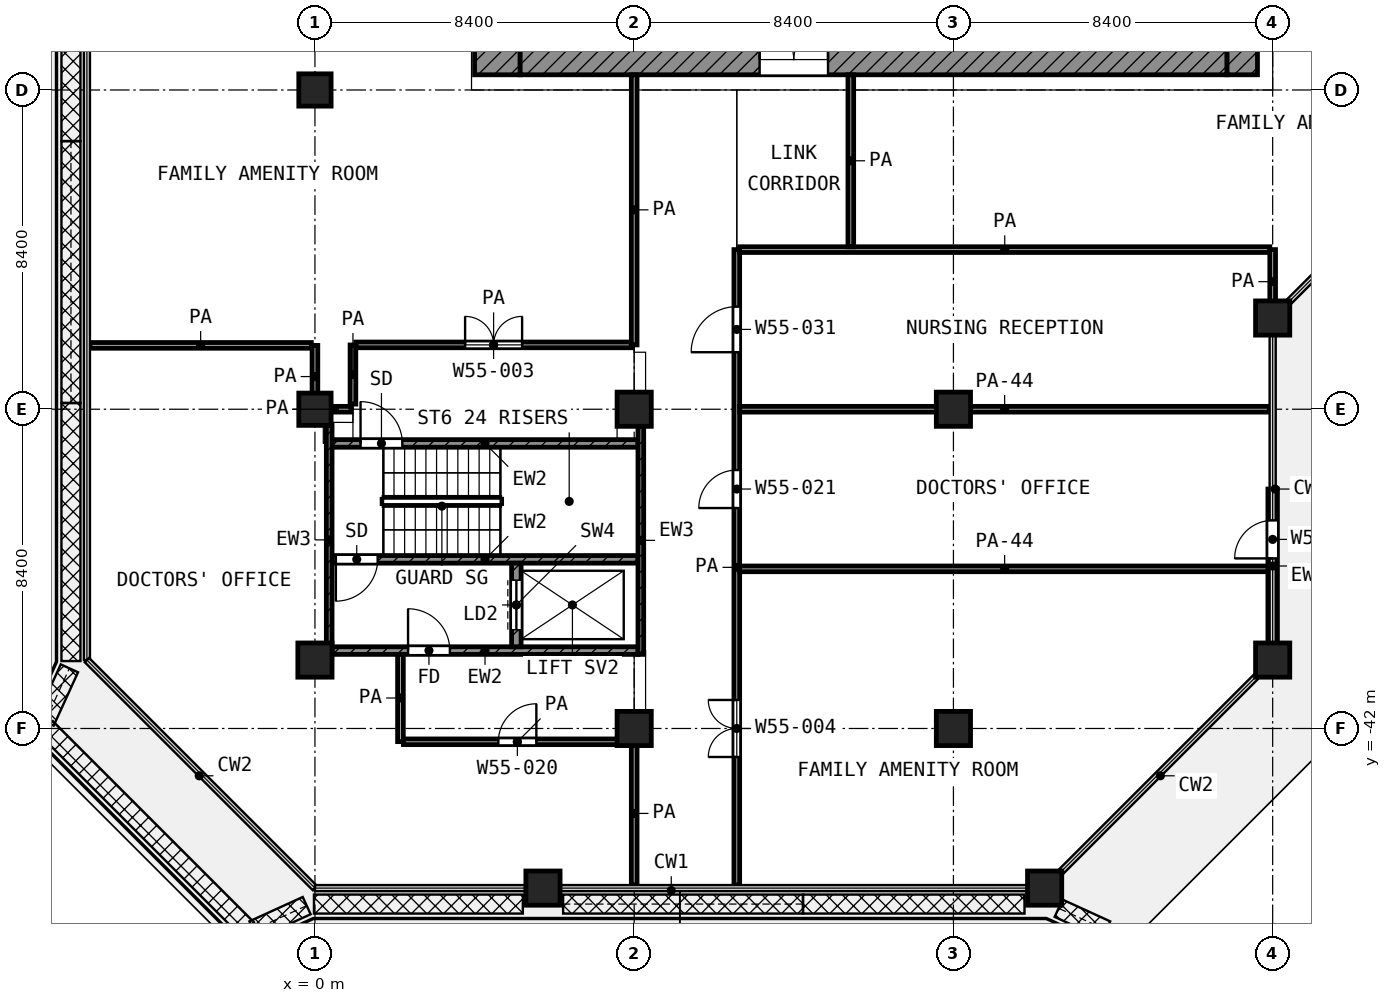
"""IFC4 building model, lengths in metres.
Left out: names, types, materials, properties, quantities, classifications, styles, units other than length and angle.
Written with IfcOpenShell. Run it as: python <this file> out.ifc"""

import sys

from ifc_helpers import new_model, si_unit, direction, frame, frame_2d, origin, origin_2d, place, context, subcontext, project, spatial, rectangle, extrude, element, fill, save


model = new_model("IFC4")
c1 = context("Model", 3, precision=1e-05, world=origin(), true_north=direction((0.0, 1.0)))
c2 = subcontext(c1, "Body", "Model", "MODEL_VIEW")
j1 = project(units=[si_unit("LENGTHUNIT", "METRE"), si_unit("PLANEANGLEUNIT", "RADIAN")], contexts=[c1])
p1 = place(None, origin())
s1 = spatial("IfcSite", under=j1, at=p1, CompositionType="ELEMENT")
p2 = place(p1, origin())
s2 = spatial("IfcBuilding", under=s1, at=p2, CompositionType="ELEMENT")
p3 = place(p2, frame((0.0, 0.0, 239.0)))
s3 = spatial("IfcBuildingStorey", under=s2, at=p3, CompositionType="ELEMENT", Elevation=239.0)
p4 = place(p3, frame((0.0, -25.2, 0.0), z_axis=(0.0, 0.0, 1.0), x_axis=(1.0, 0.0, 0.0)))
e1 = element("IfcColumn", 1, at=p4, inside=s3, PredefinedType="COLUMN", context=c2, shape_type="SweptSolid", body=[
    extrude(rectangle(XDim=0.85, YDim=0.85, at=origin_2d()), origin(), (0.0, 0.0, 1.0), 4.2),
])
p5 = place(p3, frame((25.2, -31.2, 0.0), z_axis=(0.0, 0.0, 1.0), x_axis=(1.0, 0.0, 0.0)))
e2 = element("IfcColumn", 2, at=p5, inside=s3, PredefinedType="COLUMN", context=c2, shape_type="SweptSolid", body=[
    extrude(rectangle(XDim=0.9, YDim=0.9, at=origin_2d()), origin(), (0.0, 0.0, 1.0), 4.2),
])
p6 = place(p3, frame((0.0, -33.6, 0.0), z_axis=(0.0, 0.0, 1.0), x_axis=(1.0, 0.0, 0.0)))
e3 = element("IfcColumn", 3, at=p6, inside=s3, PredefinedType="COLUMN", context=c2, shape_type="SweptSolid", body=[
    extrude(rectangle(XDim=0.85, YDim=0.85, at=origin_2d()), origin(), (0.0, 0.0, 1.0), 4.2),
])
for number, where, z_axis, x_axis in (
    (4, (8.4, -33.6, 0.0), (0.0, 0.0, 1.0), (1.0, 0.0, 0.0)),
    (5, (16.8, -33.6, 0.0), (0.0, 0.0, 1.0), (1.0, 0.0, 0.0)),
    (6, (0.0, -40.2, 0.0), (0.0, 0.0, 1.0), (1.0, 0.0, 0.0)),
    (7, (25.2, -40.2, 0.0), (0.0, 0.0, 1.0), (1.0, 0.0, 0.0)),
    (8, (8.4, -42.0, 0.0), (0.0, 0.0, 1.0), (1.0, 0.0, 0.0)),
    (9, (16.8, -42.0, 0.0), (0.0, 0.0, 1.0), (1.0, 0.0, 0.0)),
    (10, (6.0, -46.2, 0.0), (0.0, 0.0, 1.0), (1.0, 0.0, 0.0)),
    (11, (19.2, -46.2, 0.0), (0.0, 0.0, 1.0), (1.0, 0.0, 0.0)),
):
    element("IfcColumn", number, at=place(p3, frame(where, z_axis=z_axis, x_axis=x_axis)), inside=s3, PredefinedType="COLUMN", context=c2, shape_type="SweptSolid", body=[
        extrude(rectangle(XDim=0.9, YDim=0.9, at=origin_2d()), origin(), (0.0, 0.0, 1.0), 4.2),
    ])
p7 = place(p3, frame((25.2, -39.75, 0.0), z_axis=(0.0, 0.0, 1.0), x_axis=(0.0, 1.0, 0.0)))
e12 = element("IfcWall", 12, at=p7, inside=s3, PredefinedType="SOLIDWALL", context=c2, shape_type="SweptSolid", body=[
    extrude(rectangle(XDim=4.05, YDim=0.25, at=frame_2d((2.025, 0.0))), origin(), (0.0, 0.0, 1.0), 2.58),
])
p8 = place(p7, frame((2.225, 0.0, 0.0)))
e13 = element("IfcOpeningElement", 13, at=p8, cuts=e12, PredefinedType="OPENING", context=c2, shape_type="SweptSolid", body=[
    extrude(rectangle(XDim=1.0, YDim=2.1, at=frame_2d((0.5, 1.05))), frame((0.0, 0.135, 0.0), z_axis=(0.0, -1.0, 0.0), x_axis=(1.0, 0.0, 0.0)), (0.0, 0.0, 1.0), 0.27),
])
p9 = place(p3, frame((4.8, -24.8, 0.0), z_axis=(0.0, 0.0, 1.0), x_axis=(0.0, 1.0, 0.0)))
e14 = element("IfcWall", 14, at=p9, inside=s3, PredefinedType="SHEAR", context=c2, shape_type="SweptSolid", body=[
    extrude(rectangle(XDim=19.4, YDim=1.2, at=frame_2d((9.7, 0.0))), origin(), (0.0, 0.0, 1.0), 3.6),
])
p10 = place(p9, frame((11.25, 0.0, 0.0)))
e15 = element("IfcOpeningElement", 15, at=p10, cuts=e14, PredefinedType="OPENING", context=c2, shape_type="SweptSolid", body=[
    extrude(rectangle(XDim=1.1, YDim=2.1, at=frame_2d((0.55, 1.05))), frame((0.0, 0.61, 0.0), z_axis=(0.0, -1.0, 0.0), x_axis=(1.0, 0.0, 0.0)), (0.0, 0.0, 1.0), 1.22),
])
p11 = place(p9, frame((1.95, 0.0, 0.0)))
e16 = element("IfcOpeningElement", 16, at=p11, cuts=e14, PredefinedType="OPENING", context=c2, shape_type="SweptSolid", body=[
    extrude(rectangle(XDim=1.1, YDim=2.1, at=frame_2d((0.55, 1.05))), frame((0.0, 0.61, 0.0), z_axis=(0.0, -1.0, 0.0), x_axis=(1.0, 0.0, 0.0)), (0.0, 0.0, 1.0), 1.22),
])
p12 = place(p3, frame((5.4, -24.4, 0.0), z_axis=(0.0, 0.0, 1.0), x_axis=(1.0, 0.0, 0.0)))
e17 = element("IfcWall", 17, at=p12, inside=s3, PredefinedType="SHEAR", context=c2, shape_type="SweptSolid", body=[
    extrude(rectangle(XDim=18.6, YDim=0.8, at=frame_2d((9.3, 0.0))), origin(), (0.0, 0.0, 1.0), 3.6),
])
p13 = place(p12, frame((6.3, 0.0, 0.0)))
e18 = element("IfcOpeningElement", 18, at=p13, cuts=e17, PredefinedType="OPENING", context=c2, shape_type="SweptSolid", body=[
    extrude(rectangle(XDim=1.8, YDim=2.1, at=frame_2d((0.9, 1.05))), frame((0.0, 0.41, 0.0), z_axis=(0.0, -1.0, 0.0), x_axis=(1.0, 0.0, 0.0)), (0.0, 0.0, 1.0), 0.82),
])
p14 = place(p3, frame((24.4, -24.8, 0.0), z_axis=(0.0, 0.0, 1.0), x_axis=(0.0, 1.0, 0.0)))
e19 = element("IfcWall", 19, at=p14, inside=s3, PredefinedType="SHEAR", context=c2, shape_type="SweptSolid", body=[
    extrude(rectangle(XDim=0.8, YDim=0.8, at=frame_2d((0.4, 0.0))), origin(), (0.0, 0.0, 1.0), 3.6),
])
p15 = place(p3, frame((0.375, -40.05, 0.0), z_axis=(0.0, 0.0, 1.0), x_axis=(0.0, 1.0, 0.0)))
e20 = element("IfcWall", 20, at=p15, inside=s3, PredefinedType="SHEAR", context=c2, shape_type="SweptSolid", body=[
    extrude(rectangle(XDim=6.025, YDim=0.15, at=frame_2d((3.013, 0.0))), origin(), (0.0, 0.0, 1.0), 3.6),
])
p16 = place(p3, frame((8.575, -40.05, 0.0), z_axis=(0.0, 0.0, 1.0), x_axis=(0.0, 1.0, 0.0)))
e21 = element("IfcWall", 21, at=p16, inside=s3, PredefinedType="SHEAR", context=c2, shape_type="SweptSolid", body=[
    extrude(rectangle(XDim=6.0, YDim=0.15, at=frame_2d((3.0, 0.0))), origin(), (0.0, 0.0, 1.0), 3.6),
])
p17 = place(p3, frame((0.45, -34.5, 0.0), z_axis=(0.0, 0.0, 1.0), x_axis=(1.0, 0.0, 0.0)))
e22 = element("IfcWall", 22, at=p17, inside=s3, PredefinedType="SHEAR", context=c2, shape_type="SweptSolid", body=[
    extrude(rectangle(XDim=8.05, YDim=0.2, at=frame_2d((4.025, 0.0))), origin(), (0.0, 0.0, 1.0), 3.6),
])
p18 = place(p17, frame((0.75, 0.0, 0.0)))
e23 = element("IfcOpeningElement", 23, at=p18, cuts=e22, PredefinedType="OPENING", context=c2, shape_type="SweptSolid", body=[
    extrude(rectangle(XDim=1.1, YDim=2.1, at=frame_2d((0.55, 1.05))), frame((0.0, 0.11, 0.0), z_axis=(0.0, -1.0, 0.0), x_axis=(1.0, 0.0, 0.0)), (0.0, 0.0, 1.0), 0.22),
])
p19 = place(p3, frame((0.45, -37.55, 0.0), z_axis=(0.0, 0.0, 1.0), x_axis=(1.0, 0.0, 0.0)))
e24 = element("IfcWall", 24, at=p19, inside=s3, PredefinedType="SHEAR", context=c2, shape_type="SweptSolid", body=[
    extrude(rectangle(XDim=8.05, YDim=0.2, at=frame_2d((4.025, 0.0))), origin(), (0.0, 0.0, 1.0), 3.6),
])
p20 = place(p19, frame((0.1, 0.0, 0.0)))
e25 = element("IfcOpeningElement", 25, at=p20, cuts=e24, PredefinedType="OPENING", context=c2, shape_type="SweptSolid", body=[
    extrude(rectangle(XDim=1.1, YDim=2.1, at=frame_2d((0.55, 1.05))), frame((0.0, 0.11, 0.0), z_axis=(0.0, -1.0, 0.0), x_axis=(1.0, 0.0, 0.0)), (0.0, 0.0, 1.0), 0.22),
])
p21 = place(p3, frame((0.45, -39.95, 0.0), z_axis=(0.0, 0.0, 1.0), x_axis=(1.0, 0.0, 0.0)))
e26 = element("IfcWall", 26, at=p21, inside=s3, PredefinedType="SHEAR", context=c2, shape_type="SweptSolid", body=[
    extrude(rectangle(XDim=8.05, YDim=0.2, at=frame_2d((4.025, 0.0))), origin(), (0.0, 0.0, 1.0), 3.6),
])
p22 = place(p21, frame((2.0, 0.0, 0.0)))
e27 = element("IfcOpeningElement", 27, at=p22, cuts=e26, PredefinedType="OPENING", context=c2, shape_type="SweptSolid", body=[
    extrude(rectangle(XDim=1.1, YDim=2.1, at=frame_2d((0.55, 1.05))), frame((0.0, 0.11, 0.0), z_axis=(0.0, -1.0, 0.0), x_axis=(1.0, 0.0, 0.0)), (0.0, 0.0, 1.0), 0.22),
])
p23 = place(p3, frame((5.3, -39.85, 0.0), z_axis=(0.0, 0.0, 1.0), x_axis=(0.0, 1.0, 0.0)))
e28 = element("IfcWall", 28, at=p23, inside=s3, PredefinedType="SHEAR", context=c2, shape_type="SweptSolid", body=[
    extrude(rectangle(XDim=2.2, YDim=0.25, at=frame_2d((1.1, 0.0))), origin(), (0.0, 0.0, 1.0), 3.6),
])
p24 = place(p23, frame((0.45, 0.0, 0.0)))
e29 = element("IfcOpeningElement", 29, at=p24, cuts=e28, PredefinedType="OPENING", context=c2, shape_type="SweptSolid", body=[
    extrude(rectangle(XDim=1.3, YDim=2.1, at=frame_2d((0.65, 1.05))), frame((0.0, 0.135, 0.0), z_axis=(0.0, -1.0, 0.0), x_axis=(1.0, 0.0, 0.0)), (0.0, 0.0, 1.0), 0.27),
])
p25 = place(p3, frame((2.327, -42.35, 0.0), z_axis=(0.0, 0.0, 1.0), x_axis=(1.0, 0.0, 0.0)))
e30 = element("IfcWall", 30, at=p25, inside=s3, PredefinedType="PARTITIONING", context=c2, shape_type="SweptSolid", body=[
    extrude(rectangle(XDim=5.998, YDim=0.15, at=frame_2d((2.999, 0.0))), origin(), (0.0, 0.0, 1.0), 3.6),
])
p26 = place(p25, frame((2.499, 0.0, 0.0)))
e31 = element("IfcOpeningElement", 31, at=p26, cuts=e30, PredefinedType="OPENING", context=c2, shape_type="SweptSolid", body=[
    extrude(rectangle(XDim=1.0, YDim=2.1, at=frame_2d((0.5, 1.05))), frame((0.0, 0.085, 0.0), z_axis=(0.0, -1.0, 0.0), x_axis=(1.0, 0.0, 0.0)), (0.0, 0.0, 1.0), 0.17),
])
p27 = place(p3, frame((11.175, -37.8, 0.0), z_axis=(0.0, 0.0, 1.0), x_axis=(1.0, 0.0, 0.0)))
e32 = element("IfcWall", 32, at=p27, inside=s3, PredefinedType="PARTITIONING", context=c2, shape_type="SweptSolid", body=[
    extrude(rectangle(XDim=13.945, YDim=0.15, at=frame_2d((6.973, 0.0))), origin(), (0.0, 0.0, 1.0), 2.7),
])
p28 = place(p3, frame((0.075, -33.6, 0.0), z_axis=(0.0, 0.0, 1.0), x_axis=(1.0, 0.0, 0.0)))
e33 = element("IfcWall", 33, at=p28, inside=s3, PredefinedType="PARTITIONING", context=c2, shape_type="SweptSolid", body=[
    extrude(rectangle(XDim=0.875, YDim=0.15, at=frame_2d((0.438, 0.0))), origin(), (0.0, 0.0, 1.0), 3.6),
])
p29 = place(p3, frame((11.175, -33.6, 0.0), z_axis=(0.0, 0.0, 1.0), x_axis=(1.0, 0.0, 0.0)))
e34 = element("IfcWall", 34, at=p29, inside=s3, PredefinedType="PARTITIONING", context=c2, shape_type="SweptSolid", body=[
    extrude(rectangle(XDim=13.945, YDim=0.15, at=frame_2d((6.973, 0.0))), origin(), (0.0, 0.0, 1.0), 2.7),
])
p30 = place(p3, frame((-5.92, -31.92, 0.0), z_axis=(0.0, 0.0, 1.0), x_axis=(1.0, 0.0, 0.0)))
e35 = element("IfcWall", 35, at=p30, inside=s3, PredefinedType="PARTITIONING", context=c2, shape_type="SweptSolid", body=[
    extrude(rectangle(XDim=5.825, YDim=0.15, at=frame_2d((2.913, 0.0))), origin(), (0.0, 0.0, 1.0), 3.6),
])
p31 = place(p3, frame((1.077, -31.907, 0.0), z_axis=(0.0, 0.0, 1.0), x_axis=(1.0, 0.0, 0.0)))
e36 = element("IfcWall", 36, at=p31, inside=s3, PredefinedType="PARTITIONING", context=c2, shape_type="SweptSolid", body=[
    extrude(rectangle(XDim=7.248, YDim=0.15, at=frame_2d((3.624, 0.0))), origin(), (0.0, 0.0, 1.0), 3.6),
])
p32 = place(p31, frame((2.874, 0.0, 0.0)))
e37 = element("IfcOpeningElement", 37, at=p32, cuts=e36, PredefinedType="OPENING", context=c2, shape_type="SweptSolid", body=[
    extrude(rectangle(XDim=1.5, YDim=2.1, at=frame_2d((0.75, 1.05))), frame((0.0, 0.085, 0.0), z_axis=(0.0, -1.0, 0.0), x_axis=(1.0, 0.0, 0.0)), (0.0, 0.0, 1.0), 0.17),
])
p33 = place(p3, frame((11.175, -29.4, 0.0), z_axis=(0.0, 0.0, 1.0), x_axis=(1.0, 0.0, 0.0)))
e38 = element("IfcWall", 38, at=p33, inside=s3, PredefinedType="PARTITIONING", context=c2, shape_type="SweptSolid", body=[
    extrude(rectangle(XDim=13.95, YDim=0.15, at=frame_2d((6.975, 0.0))), origin(), (0.0, 0.0, 1.0), 3.6),
])
p34 = place(p3, frame((0.0, -33.56, 0.0), z_axis=(0.0, 0.0, 1.0), x_axis=(0.0, 1.0, 0.0)))
e39 = element("IfcWall", 39, at=p34, inside=s3, PredefinedType="PARTITIONING", context=c2, shape_type="SweptSolid", body=[
    extrude(rectangle(XDim=1.639, YDim=0.15, at=frame_2d((0.82, 0.0))), origin(), (0.0, 0.0, 1.0), 3.6),
])
p35 = place(p3, frame((1.0, -33.465, 0.0), z_axis=(0.0, 0.0, 1.0), x_axis=(0.0, 1.0, 0.0)))
e40 = element("IfcWall", 40, at=p35, inside=s3, PredefinedType="PARTITIONING", context=c2, shape_type="SweptSolid", body=[
    extrude(rectangle(XDim=1.556, YDim=0.15, at=frame_2d((0.778, 0.0))), origin(), (0.0, 0.0, 1.0), 3.6),
])
p36 = place(p3, frame((2.25, -42.346, 0.0), z_axis=(0.0, 0.0, 1.0), x_axis=(0.0, 1.0, 0.0)))
e41 = element("IfcWall", 41, at=p36, inside=s3, PredefinedType="PARTITIONING", context=c2, shape_type="SweptSolid", body=[
    extrude(rectangle(XDim=2.296, YDim=0.15, at=frame_2d((1.148, 0.0))), origin(), (0.0, 0.0, 1.0), 3.6),
])
p37 = place(p3, frame((8.4, -46.12, 0.0), z_axis=(0.0, 0.0, 1.0), x_axis=(0.0, 1.0, 0.0)))
e42 = element("IfcWall", 42, at=p37, inside=s3, PredefinedType="PARTITIONING", context=c2, shape_type="SweptSolid", body=[
    extrude(rectangle(XDim=3.77, YDim=0.15, at=frame_2d((1.885, 0.0))), origin(), (0.0, 0.0, 1.0), 3.6),
])
p38 = place(p3, frame((8.4, -31.907, 0.0), z_axis=(0.0, 0.0, 1.0), x_axis=(0.0, 1.0, 0.0)))
e43 = element("IfcWall", 43, at=p38, inside=s3, PredefinedType="PARTITIONING", context=c2, shape_type="SweptSolid", body=[
    extrude(rectangle(XDim=7.107, YDim=0.15, at=frame_2d((3.553, 0.0))), origin(), (0.0, 0.0, 1.0), 3.6),
])
p39 = place(p3, frame((11.1, -46.12, 0.0), z_axis=(0.0, 0.0, 1.0), x_axis=(0.0, 1.0, 0.0)))
e44 = element("IfcWall", 44, at=p39, inside=s3, PredefinedType="PARTITIONING", context=c2, shape_type="SweptSolid", body=[
    extrude(rectangle(XDim=16.72, YDim=0.15, at=frame_2d((8.36, 0.0))), origin(), (0.0, 0.0, 1.0), 3.6),
])
p40 = place(p39, frame((14.02, 0.0, 0.0)))
e45 = element("IfcOpeningElement", 45, at=p40, cuts=e44, PredefinedType="OPENING", context=c2, shape_type="SweptSolid", body=[
    extrude(rectangle(XDim=1.2, YDim=2.1, at=frame_2d((0.6, 1.05))), frame((0.0, 0.085, 0.0), z_axis=(0.0, -1.0, 0.0), x_axis=(1.0, 0.0, 0.0)), (0.0, 0.0, 1.0), 0.17),
])
p41 = place(p39, frame((9.92, 0.0, 0.0)))
e46 = element("IfcOpeningElement", 46, at=p41, cuts=e44, PredefinedType="OPENING", context=c2, shape_type="SweptSolid", body=[
    extrude(rectangle(XDim=1.0, YDim=2.1, at=frame_2d((0.5, 1.05))), frame((0.0, 0.085, 0.0), z_axis=(0.0, -1.0, 0.0), x_axis=(1.0, 0.0, 0.0)), (0.0, 0.0, 1.0), 0.17),
])
p42 = place(p39, frame((3.37, 0.0, 0.0)))
e47 = element("IfcOpeningElement", 47, at=p42, cuts=e44, PredefinedType="OPENING", context=c2, shape_type="SweptSolid", body=[
    extrude(rectangle(XDim=1.5, YDim=2.1, at=frame_2d((0.75, 1.05))), frame((0.0, 0.085, 0.0), z_axis=(0.0, -1.0, 0.0), x_axis=(1.0, 0.0, 0.0)), (0.0, 0.0, 1.0), 0.17),
])
p43 = place(p3, frame((14.1, -29.325, 0.0), z_axis=(0.0, 0.0, 1.0), x_axis=(0.0, 1.0, 0.0)))
e48 = element("IfcWall", 48, at=p43, inside=s3, PredefinedType="PARTITIONING", context=c2, shape_type="SweptSolid", body=[
    extrude(rectangle(XDim=4.525, YDim=0.15, at=frame_2d((2.262, 0.0))), origin(), (0.0, 0.0, 1.0), 3.6),
])
p44 = place(p3, frame((25.2, -31.087, 0.0), z_axis=(0.0, 0.0, 1.0), x_axis=(0.0, 1.0, 0.0)))
e49 = element("IfcWall", 49, at=p44, inside=s3, PredefinedType="PARTITIONING", context=c2, shape_type="SweptSolid", body=[
    extrude(rectangle(XDim=1.687, YDim=0.15, at=frame_2d((0.844, 0.0))), origin(), (0.0, 0.0, 1.0), 3.6),
])
p45 = place(p8, origin())
e50 = element("IfcDoor", 50, at=p45, inside=s3, OperationType="SINGLE_SWING_LEFT", PredefinedType="DOOR", context=c2, shape_type="SweptSolid", body=[
    extrude(rectangle(XDim=1.0, YDim=2.1, at=frame_2d((0.5, 1.05))), frame((0.0, 0.025, 0.0), z_axis=(0.0, -1.0, 0.0), x_axis=(1.0, 0.0, 0.0)), (0.0, 0.0, 1.0), 0.05),
])
fill(e13, e50)
p46 = place(p13, origin())
e51 = element("IfcDoor", 51, at=p46, inside=s3, OperationType="DOUBLE_DOOR_SINGLE_SWING", PredefinedType="DOOR", context=c2, shape_type="SweptSolid", body=[
    extrude(rectangle(XDim=1.8, YDim=2.1, at=frame_2d((0.9, 1.05))), frame((0.0, 0.025, 0.0), z_axis=(0.0, -1.0, 0.0), x_axis=(1.0, 0.0, 0.0)), (0.0, 0.0, 1.0), 0.05),
])
fill(e18, e51)
p47 = place(p18, origin())
e52 = element("IfcDoor", 52, at=p47, inside=s3, OperationType="SINGLE_SWING_LEFT", PredefinedType="DOOR", context=c2, shape_type="SweptSolid", body=[
    extrude(rectangle(XDim=1.1, YDim=2.1, at=frame_2d((0.55, 1.05))), frame((0.0, 0.025, 0.0), z_axis=(0.0, -1.0, 0.0), x_axis=(1.0, 0.0, 0.0)), (0.0, 0.0, 1.0), 0.05),
])
fill(e23, e52)
p48 = place(p20, frame((1.1, 0.0, 0.0), z_axis=(0.0, 0.0, 1.0), x_axis=(-1.0, 0.0, 0.0)))
e53 = element("IfcDoor", 53, at=p48, inside=s3, OperationType="SINGLE_SWING_LEFT", PredefinedType="DOOR", context=c2, shape_type="SweptSolid", body=[
    extrude(rectangle(XDim=1.1, YDim=2.1, at=frame_2d((0.55, 1.05))), frame((0.0, 0.025, 0.0), z_axis=(0.0, -1.0, 0.0), x_axis=(1.0, 0.0, 0.0)), (0.0, 0.0, 1.0), 0.05),
])
fill(e25, e53)
p49 = place(p24, origin())
e54 = element("IfcDoor", 54, at=p49, inside=s3, OperationType="DOUBLE_DOOR_SLIDING", PredefinedType="DOOR", context=c2, shape_type="SweptSolid", body=[
    extrude(rectangle(XDim=1.3, YDim=2.1, at=frame_2d((0.65, 1.05))), frame((0.0, 0.025, 0.0), z_axis=(0.0, -1.0, 0.0), x_axis=(1.0, 0.0, 0.0)), (0.0, 0.0, 1.0), 0.05),
])
fill(e29, e54)
p50 = place(p22, origin())
e55 = element("IfcDoor", 55, at=p50, inside=s3, OperationType="SINGLE_SWING_LEFT", PredefinedType="DOOR", context=c2, shape_type="SweptSolid", body=[
    extrude(rectangle(XDim=1.1, YDim=2.1, at=frame_2d((0.55, 1.05))), frame((0.0, 0.025, 0.0), z_axis=(0.0, -1.0, 0.0), x_axis=(1.0, 0.0, 0.0)), (0.0, 0.0, 1.0), 0.05),
])
fill(e27, e55)
p51 = place(p32, origin())
e56 = element("IfcDoor", 56, at=p51, inside=s3, OperationType="DOUBLE_DOOR_SINGLE_SWING", PredefinedType="DOOR", context=c2, shape_type="SweptSolid", body=[
    extrude(rectangle(XDim=1.5, YDim=2.1, at=frame_2d((0.75, 1.05))), frame((0.0, 0.025, 0.0), z_axis=(0.0, -1.0, 0.0), x_axis=(1.0, 0.0, 0.0)), (0.0, 0.0, 1.0), 0.05),
])
fill(e37, e56)
p52 = place(p26, origin())
e57 = element("IfcDoor", 57, at=p52, inside=s3, OperationType="SINGLE_SWING_RIGHT", PredefinedType="DOOR", context=c2, shape_type="SweptSolid", body=[
    extrude(rectangle(XDim=1.0, YDim=2.1, at=frame_2d((0.5, 1.05))), frame((0.0, 0.025, 0.0), z_axis=(0.0, -1.0, 0.0), x_axis=(1.0, 0.0, 0.0)), (0.0, 0.0, 1.0), 0.05),
])
fill(e31, e57)
p53 = place(p40, origin())
e58 = element("IfcDoor", 58, at=p53, inside=s3, OperationType="SINGLE_SWING_LEFT", PredefinedType="DOOR", context=c2, shape_type="SweptSolid", body=[
    extrude(rectangle(XDim=1.2, YDim=2.1, at=frame_2d((0.6, 1.05))), frame((0.0, 0.025, 0.0), z_axis=(0.0, -1.0, 0.0), x_axis=(1.0, 0.0, 0.0)), (0.0, 0.0, 1.0), 0.05),
])
fill(e45, e58)
p54 = place(p41, origin())
e59 = element("IfcDoor", 59, at=p54, inside=s3, OperationType="SINGLE_SWING_LEFT", PredefinedType="DOOR", context=c2, shape_type="SweptSolid", body=[
    extrude(rectangle(XDim=1.0, YDim=2.1, at=frame_2d((0.5, 1.05))), frame((0.0, 0.025, 0.0), z_axis=(0.0, -1.0, 0.0), x_axis=(1.0, 0.0, 0.0)), (0.0, 0.0, 1.0), 0.05),
])
fill(e46, e59)
p55 = place(p42, origin())
e60 = element("IfcDoor", 60, at=p55, inside=s3, OperationType="DOUBLE_DOOR_SINGLE_SWING", PredefinedType="DOOR", context=c2, shape_type="SweptSolid", body=[
    extrude(rectangle(XDim=1.5, YDim=2.1, at=frame_2d((0.75, 1.05))), frame((0.0, 0.025, 0.0), z_axis=(0.0, -1.0, 0.0), x_axis=(1.0, 0.0, 0.0)), (0.0, 0.0, 1.0), 0.05),
])
fill(e47, e60)
save(model, sys.argv[1])
